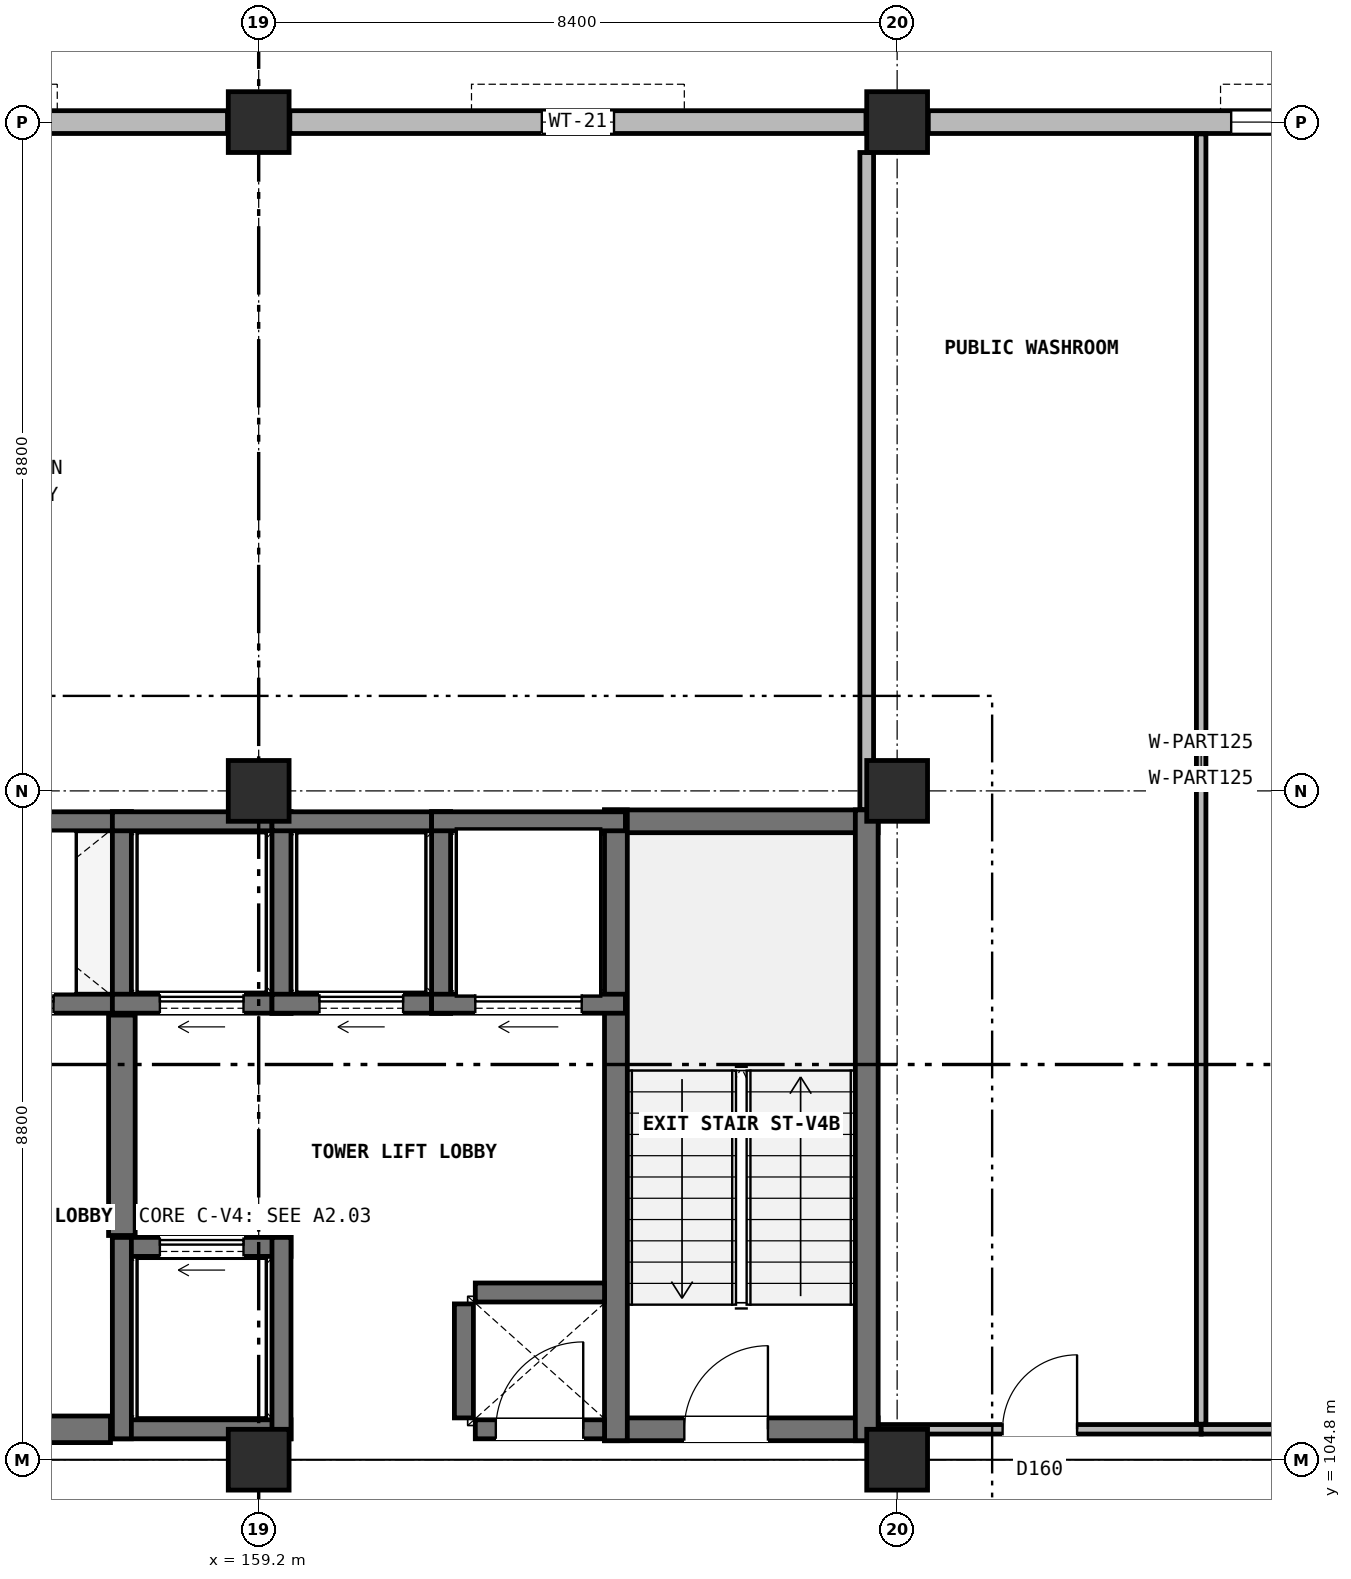
"""IFC4 building model, lengths in metres.
Left out: names, types, materials, properties, quantities, classifications, styles, units other than length and angle.
Written with IfcOpenShell. Run it as: python <this file> out.ifc"""

import sys

from ifc_helpers import new_model, si_unit, direction, frame, frame_2d, origin, origin_2d, place, context, subcontext, project, spatial, rectangle, extrude, element, fill, save


model = new_model("IFC4")
c1 = context("Model", 3, precision=1e-05, world=origin(), true_north=direction((0.0, 1.0)))
c2 = subcontext(c1, "Body", "Model", "MODEL_VIEW")
j1 = project(units=[si_unit("LENGTHUNIT", "METRE"), si_unit("PLANEANGLEUNIT", "RADIAN")], contexts=[c1])
p1 = place(None, origin())
s1 = spatial("IfcSite", under=j1, at=p1, CompositionType="ELEMENT")
p2 = place(p1, origin())
s2 = spatial("IfcBuilding", under=s1, at=p2, CompositionType="ELEMENT")
p3 = place(p2, frame((0.0, 0.0, 4.8)))
s3 = spatial("IfcBuildingStorey", under=s2, at=p3, CompositionType="ELEMENT", Elevation=4.8)
for number, where, z_axis, x_axis in (
    (1, (159.2, 104.8, 0.0), (0.0, 0.0, 1.0), (1.0, 0.0, 0.0)),
    (2, (159.2, 113.6, 0.0), (0.0, 0.0, 1.0), (1.0, 0.0, 0.0)),
    (3, (159.2, 122.4, 0.0), (0.0, 0.0, 1.0), (1.0, 0.0, 0.0)),
    (4, (167.6, 104.8, 0.0), (0.0, 0.0, 1.0), (1.0, 0.0, 0.0)),
    (5, (167.6, 113.6, 0.0), (0.0, 0.0, 1.0), (1.0, 0.0, 0.0)),
    (6, (167.6, 122.4, 0.0), (0.0, 0.0, 1.0), (1.0, 0.0, 0.0)),
):
    element("IfcColumn", number, at=place(p3, frame(where, z_axis=z_axis, x_axis=x_axis)), inside=s3, PredefinedType="COLUMN", context=c2, shape_type="SweptSolid", body=[
        extrude(rectangle(XDim=0.8, YDim=0.8, at=origin_2d()), origin(), (0.0, 0.0, 1.0), 4.2),
    ])
p4 = place(p3, frame((175.59, 122.4, 0.0), z_axis=(0.0, 0.0, 1.0), x_axis=(-1.0, 0.0, 0.0)))
e7 = element("IfcWall", 7, at=p4, inside=s3, PredefinedType="SOLIDWALL", context=c2, shape_type="SweptSolid", body=[
    extrude(rectangle(XDim=7.58, YDim=0.3, at=frame_2d((3.79, 0.0))), origin(), (0.0, 0.0, 1.0), 3.45),
])
p5 = place(p4, frame((0.395, 0.0, 0.9)))
e8 = element("IfcOpeningElement", 8, at=p5, cuts=e7, PredefinedType="OPENING", context=c2, shape_type="SweptSolid", body=[
    extrude(rectangle(XDim=3.2, YDim=2.1, at=frame_2d((1.6, 1.05))), frame((0.0, 0.16, 0.0), z_axis=(0.0, -1.0, 0.0), x_axis=(1.0, 0.0, 0.0)), (0.0, 0.0, 1.0), 0.32),
])
p6 = place(p3, frame((167.19, 122.4, 0.0), z_axis=(0.0, 0.0, 1.0), x_axis=(-1.0, 0.0, 0.0)))
e9 = element("IfcWall", 9, at=p6, inside=s3, PredefinedType="SOLIDWALL", context=c2, shape_type="SweptSolid", body=[
    extrude(rectangle(XDim=7.58, YDim=0.3, at=frame_2d((3.79, 0.0))), origin(), (0.0, 0.0, 1.0), 3.45),
])
p7 = place(p6, frame((3.315, 0.0, 0.9)))
e10 = element("IfcOpeningElement", 10, at=p7, cuts=e9, PredefinedType="OPENING", context=c2, shape_type="SweptSolid", body=[
    extrude(rectangle(XDim=0.95, YDim=1.6, at=frame_2d((0.475, 0.8))), frame((0.0, 0.16, 0.0), z_axis=(0.0, -1.0, 0.0), x_axis=(1.0, 0.0, 0.0)), (0.0, 0.0, 1.0), 0.32),
])
p8 = place(p3, frame((158.79, 122.4, 0.0), z_axis=(0.0, 0.0, 1.0), x_axis=(-1.0, 0.0, 0.0)))
e11 = element("IfcWall", 11, at=p8, inside=s3, PredefinedType="SOLIDWALL", context=c2, shape_type="SweptSolid", body=[
    extrude(rectangle(XDim=7.58, YDim=0.3, at=frame_2d((3.79, 0.0))), origin(), (0.0, 0.0, 1.0), 3.45),
])
p9 = place(p8, frame((3.24, 0.0, 0.9)))
e12 = element("IfcOpeningElement", 12, at=p9, cuts=e11, PredefinedType="OPENING", context=c2, shape_type="SweptSolid", body=[
    extrude(rectangle(XDim=1.1, YDim=1.65, at=frame_2d((0.55, 0.825))), frame((0.0, 0.16, 0.0), z_axis=(0.0, -1.0, 0.0), x_axis=(1.0, 0.0, 0.0)), (0.0, 0.0, 1.0), 0.32),
])
p10 = place(p3, frame((163.75, 105.2, 0.0), z_axis=(0.0, 0.0, 1.0), x_axis=(1.0, 0.0, 0.0)))
e13 = element("IfcWall", 13, at=p10, inside=s3, PredefinedType="SHEAR", context=c2, shape_type="SweptSolid", body=[
    extrude(rectangle(XDim=3.6, YDim=0.3, at=frame_2d((1.8, 0.0))), origin(), (0.0, 0.0, 1.0), 4.2),
])
p11 = place(p10, frame((1.05, 0.0, 0.0)))
e14 = element("IfcOpeningElement", 14, at=p11, cuts=e13, PredefinedType="OPENING", context=c2, shape_type="SweptSolid", body=[
    extrude(rectangle(XDim=1.1, YDim=2.2, at=frame_2d((0.55, 1.1))), frame((0.0, 0.16, 0.0), z_axis=(0.0, -1.0, 0.0), x_axis=(1.0, 0.0, 0.0)), (0.0, 0.0, 1.0), 0.32),
])
p12 = place(p3, frame((163.75, 113.2, 0.0), z_axis=(0.0, 0.0, 1.0), x_axis=(1.0, 0.0, 0.0)))
e15 = element("IfcWall", 15, at=p12, inside=s3, PredefinedType="SHEAR", context=c2, shape_type="SweptSolid", body=[
    extrude(rectangle(XDim=3.6, YDim=0.3, at=frame_2d((1.8, 0.0))), origin(), (0.0, 0.0, 1.0), 4.2),
])
for number, where, z_axis, x_axis in (
    (16, (163.9, 105.05, 0.0), (0.0, 0.0, 1.0), (0.0, 1.0, 0.0)),
    (17, (167.2, 105.05, 0.0), (0.0, 0.0, 1.0), (0.0, 1.0, 0.0)),
):
    element("IfcWall", number, at=place(p3, frame(where, z_axis=z_axis, x_axis=x_axis)), inside=s3, PredefinedType="SHEAR", context=c2, shape_type="SweptSolid", body=[
        extrude(rectangle(XDim=8.3, YDim=0.3, at=frame_2d((4.15, 0.0))), origin(), (0.0, 0.0, 1.0), 4.2),
    ])
p13 = place(p3, frame((154.275, 110.8, 0.0), z_axis=(0.0, 0.0, 1.0), x_axis=(1.0, 0.0, 0.0)))
e18 = element("IfcWall", 18, at=p13, inside=s3, PredefinedType="SOLIDWALL", context=c2, shape_type="SweptSolid", body=[
    extrude(rectangle(XDim=3.25, YDim=0.25, at=frame_2d((1.625, 0.0))), origin(), (0.0, 0.0, 1.0), 3.88),
])
p14 = place(p13, frame((1.025, 0.0, 0.0)))
e19 = element("IfcOpeningElement", 19, at=p14, cuts=e18, PredefinedType="OPENING", context=c2, shape_type="SweptSolid", body=[
    extrude(rectangle(XDim=1.2, YDim=2.2, at=frame_2d((0.6, 1.1))), frame((0.0, 0.135, 0.0), z_axis=(0.0, -1.0, 0.0), x_axis=(1.0, 0.0, 0.0)), (0.0, 0.0, 1.0), 0.27),
])
p15 = place(p3, frame((154.275, 113.2, 0.0), z_axis=(0.0, 0.0, 1.0), x_axis=(1.0, 0.0, 0.0)))
e20 = element("IfcWall", 20, at=p15, inside=s3, PredefinedType="SOLIDWALL", context=c2, shape_type="SweptSolid", body=[
    extrude(rectangle(XDim=3.25, YDim=0.25, at=frame_2d((1.625, 0.0))), origin(), (0.0, 0.0, 1.0), 3.88),
])
p16 = place(p3, frame((157.4, 110.675, 0.0), z_axis=(0.0, 0.0, 1.0), x_axis=(0.0, 1.0, 0.0)))
e21 = element("IfcWall", 21, at=p16, inside=s3, PredefinedType="SOLIDWALL", context=c2, shape_type="SweptSolid", body=[
    extrude(rectangle(XDim=2.65, YDim=0.25, at=frame_2d((1.325, 0.0))), origin(), (0.0, 0.0, 1.0), 3.88),
])
p17 = place(p3, frame((157.275, 110.8, 0.0), z_axis=(0.0, 0.0, 1.0), x_axis=(1.0, 0.0, 0.0)))
e22 = element("IfcWall", 22, at=p17, inside=s3, PredefinedType="SOLIDWALL", context=c2, shape_type="SweptSolid", body=[
    extrude(rectangle(XDim=2.35, YDim=0.25, at=frame_2d((1.175, 0.0))), origin(), (0.0, 0.0, 1.0), 3.88),
])
p18 = place(p17, frame((0.625, 0.0, 0.0)))
e23 = element("IfcOpeningElement", 23, at=p18, cuts=e22, PredefinedType="OPENING", context=c2, shape_type="SweptSolid", body=[
    extrude(rectangle(XDim=1.1, YDim=2.2, at=frame_2d((0.55, 1.1))), frame((0.0, 0.135, 0.0), z_axis=(0.0, -1.0, 0.0), x_axis=(1.0, 0.0, 0.0)), (0.0, 0.0, 1.0), 0.27),
])
p19 = place(p3, frame((157.275, 113.2, 0.0), z_axis=(0.0, 0.0, 1.0), x_axis=(1.0, 0.0, 0.0)))
e24 = element("IfcWall", 24, at=p19, inside=s3, PredefinedType="SOLIDWALL", context=c2, shape_type="SweptSolid", body=[
    extrude(rectangle(XDim=2.35, YDim=0.25, at=frame_2d((1.175, 0.0))), origin(), (0.0, 0.0, 1.0), 3.88),
])
p20 = place(p3, frame((159.5, 110.675, 0.0), z_axis=(0.0, 0.0, 1.0), x_axis=(0.0, 1.0, 0.0)))
e25 = element("IfcWall", 25, at=p20, inside=s3, PredefinedType="SOLIDWALL", context=c2, shape_type="SweptSolid", body=[
    extrude(rectangle(XDim=2.65, YDim=0.25, at=frame_2d((1.325, 0.0))), origin(), (0.0, 0.0, 1.0), 3.88),
])
p21 = place(p3, frame((159.375, 110.8, 0.0), z_axis=(0.0, 0.0, 1.0), x_axis=(1.0, 0.0, 0.0)))
e26 = element("IfcWall", 26, at=p21, inside=s3, PredefinedType="SOLIDWALL", context=c2, shape_type="SweptSolid", body=[
    extrude(rectangle(XDim=2.35, YDim=0.25, at=frame_2d((1.175, 0.0))), origin(), (0.0, 0.0, 1.0), 3.88),
])
p22 = place(p21, frame((0.625, 0.0, 0.0)))
e27 = element("IfcOpeningElement", 27, at=p22, cuts=e26, PredefinedType="OPENING", context=c2, shape_type="SweptSolid", body=[
    extrude(rectangle(XDim=1.1, YDim=2.2, at=frame_2d((0.55, 1.1))), frame((0.0, 0.135, 0.0), z_axis=(0.0, -1.0, 0.0), x_axis=(1.0, 0.0, 0.0)), (0.0, 0.0, 1.0), 0.27),
])
p23 = place(p3, frame((159.375, 113.2, 0.0), z_axis=(0.0, 0.0, 1.0), x_axis=(1.0, 0.0, 0.0)))
e28 = element("IfcWall", 28, at=p23, inside=s3, PredefinedType="SOLIDWALL", context=c2, shape_type="SweptSolid", body=[
    extrude(rectangle(XDim=2.35, YDim=0.25, at=frame_2d((1.175, 0.0))), origin(), (0.0, 0.0, 1.0), 3.88),
])
p24 = place(p3, frame((161.6, 110.675, 0.0), z_axis=(0.0, 0.0, 1.0), x_axis=(0.0, 1.0, 0.0)))
e29 = element("IfcWall", 29, at=p24, inside=s3, PredefinedType="SOLIDWALL", context=c2, shape_type="SweptSolid", body=[
    extrude(rectangle(XDim=2.65, YDim=0.25, at=frame_2d((1.325, 0.0))), origin(), (0.0, 0.0, 1.0), 3.88),
])
p25 = place(p3, frame((157.275, 105.2, 0.0), z_axis=(0.0, 0.0, 1.0), x_axis=(1.0, 0.0, 0.0)))
e30 = element("IfcWall", 30, at=p25, inside=s3, PredefinedType="SOLIDWALL", context=c2, shape_type="SweptSolid", body=[
    extrude(rectangle(XDim=2.35, YDim=0.25, at=frame_2d((1.175, 0.0))), origin(), (0.0, 0.0, 1.0), 3.88),
])
p26 = place(p3, frame((157.275, 107.6, 0.0), z_axis=(0.0, 0.0, 1.0), x_axis=(1.0, 0.0, 0.0)))
e31 = element("IfcWall", 31, at=p26, inside=s3, PredefinedType="SOLIDWALL", context=c2, shape_type="SweptSolid", body=[
    extrude(rectangle(XDim=2.35, YDim=0.25, at=frame_2d((1.175, 0.0))), origin(), (0.0, 0.0, 1.0), 3.88),
])
p27 = place(p26, frame((0.625, 0.0, 0.0)))
e32 = element("IfcOpeningElement", 32, at=p27, cuts=e31, PredefinedType="OPENING", context=c2, shape_type="SweptSolid", body=[
    extrude(rectangle(XDim=1.1, YDim=2.2, at=frame_2d((0.55, 1.1))), frame((0.0, 0.135, 0.0), z_axis=(0.0, -1.0, 0.0), x_axis=(1.0, 0.0, 0.0)), (0.0, 0.0, 1.0), 0.27),
])
for number, where, z_axis, x_axis in (
    (33, (157.4, 105.075, 0.0), (0.0, 0.0, 1.0), (0.0, 1.0, 0.0)),
    (34, (159.5, 105.075, 0.0), (0.0, 0.0, 1.0), (0.0, 1.0, 0.0)),
):
    element("IfcWall", number, at=place(p3, frame(where, z_axis=z_axis, x_axis=x_axis)), inside=s3, PredefinedType="SOLIDWALL", context=c2, shape_type="SweptSolid", body=[
        extrude(rectangle(XDim=2.65, YDim=0.25, at=frame_2d((1.325, 0.0))), origin(), (0.0, 0.0, 1.0), 3.88),
    ])
p28 = place(p3, frame((161.475, 110.8, 0.0), z_axis=(0.0, 0.0, 1.0), x_axis=(1.0, 0.0, 0.0)))
e35 = element("IfcWall", 35, at=p28, inside=s3, PredefinedType="SOLIDWALL", context=c2, shape_type="SweptSolid", body=[
    extrude(rectangle(XDim=2.55, YDim=0.25, at=frame_2d((1.275, 0.0))), origin(), (0.0, 0.0, 1.0), 3.88),
])
p29 = place(p28, frame((0.575, 0.0, 0.0)))
e36 = element("IfcOpeningElement", 36, at=p29, cuts=e35, PredefinedType="OPENING", context=c2, shape_type="SweptSolid", body=[
    extrude(rectangle(XDim=1.4, YDim=2.3, at=frame_2d((0.7, 1.15))), frame((0.0, 0.135, 0.0), z_axis=(0.0, -1.0, 0.0), x_axis=(1.0, 0.0, 0.0)), (0.0, 0.0, 1.0), 0.27),
])
p30 = place(p3, frame((161.475, 113.2, 0.0), z_axis=(0.0, 0.0, 1.0), x_axis=(1.0, 0.0, 0.0)))
e37 = element("IfcWall", 37, at=p30, inside=s3, PredefinedType="SOLIDWALL", context=c2, shape_type="SweptSolid", body=[
    extrude(rectangle(XDim=2.55, YDim=0.25, at=frame_2d((1.275, 0.0))), origin(), (0.0, 0.0, 1.0), 3.88),
])
p31 = place(p3, frame((157.4, 107.75, 0.0), z_axis=(0.0, 0.0, 1.0), x_axis=(0.0, 1.0, 0.0)))
e38 = element("IfcWall", 38, at=p31, inside=s3, PredefinedType="SHEAR", context=c2, shape_type="SweptSolid", body=[
    extrude(rectangle(XDim=2.9, YDim=0.35, at=frame_2d((1.45, 0.0))), origin(), (0.0, 0.0, 1.0), 3.88),
])
p32 = place(p3, frame((154.55, 105.2, 0.0), z_axis=(0.0, 0.0, 1.0), x_axis=(1.0, 0.0, 0.0)))
e39 = element("IfcWall", 39, at=p32, inside=s3, PredefinedType="SHEAR", context=c2, shape_type="SweptSolid", body=[
    extrude(rectangle(XDim=2.7, YDim=0.35, at=frame_2d((1.35, 0.0))), origin(), (0.0, 0.0, 1.0), 3.88),
])
p33 = place(p32, frame((0.8, 0.0, 0.0)))
e40 = element("IfcOpeningElement", 40, at=p33, cuts=e39, PredefinedType="OPENING", context=c2, shape_type="SweptSolid", body=[
    extrude(rectangle(XDim=1.1, YDim=2.2, at=frame_2d((0.55, 1.1))), frame((0.0, 0.185, 0.0), z_axis=(0.0, -1.0, 0.0), x_axis=(1.0, 0.0, 0.0)), (0.0, 0.0, 1.0), 0.37),
])
p34 = place(p3, frame((161.9, 105.35, 0.0), z_axis=(0.0, 0.0, 1.0), x_axis=(0.0, 1.0, 0.0)))
e41 = element("IfcWall", 41, at=p34, inside=s3, PredefinedType="SOLIDWALL", context=c2, shape_type="SweptSolid", body=[
    extrude(rectangle(XDim=1.5, YDim=0.25, at=frame_2d((0.75, 0.0))), origin(), (0.0, 0.0, 1.0), 3.88),
])
p35 = place(p3, frame((162.05, 107.0, 0.0), z_axis=(0.0, 0.0, 1.0), x_axis=(1.0, 0.0, 0.0)))
e42 = element("IfcWall", 42, at=p35, inside=s3, PredefinedType="SOLIDWALL", context=c2, shape_type="SweptSolid", body=[
    extrude(rectangle(XDim=1.7, YDim=0.25, at=frame_2d((0.85, 0.0))), origin(), (0.0, 0.0, 1.0), 3.88),
])
p36 = place(p3, frame((162.05, 105.2, 0.0), z_axis=(0.0, 0.0, 1.0), x_axis=(1.0, 0.0, 0.0)))
e43 = element("IfcWall", 43, at=p36, inside=s3, PredefinedType="SOLIDWALL", context=c2, shape_type="SweptSolid", body=[
    extrude(rectangle(XDim=1.7, YDim=0.25, at=frame_2d((0.85, 0.0))), origin(), (0.0, 0.0, 1.0), 3.88),
])
p37 = place(p36, frame((0.27, 0.0, 0.0)))
e44 = element("IfcOpeningElement", 44, at=p37, cuts=e43, PredefinedType="OPENING", context=c2, shape_type="SweptSolid", body=[
    extrude(rectangle(XDim=1.15, YDim=2.2, at=frame_2d((0.575, 1.1))), frame((0.0, 0.135, 0.0), z_axis=(0.0, -1.0, 0.0), x_axis=(1.0, 0.0, 0.0)), (0.0, 0.0, 1.0), 0.27),
])
p38 = place(p3, frame((167.355, 105.2, 0.0), z_axis=(0.0, 0.0, 1.0), x_axis=(1.0, 0.0, 0.0)))
e45 = element("IfcWall", 45, at=p38, inside=s3, PredefinedType="PARTITIONING", context=c2, shape_type="SweptSolid", body=[
    extrude(rectangle(XDim=4.245, YDim=0.125, at=frame_2d((2.123, 0.0))), origin(), (0.0, 0.0, 1.0), 3.445),
])
p39 = place(p38, frame((1.633, 0.0, 0.0)))
e46 = element("IfcOpeningElement", 46, at=p39, cuts=e45, PredefinedType="OPENING", context=c2, shape_type="SweptSolid", body=[
    extrude(rectangle(XDim=0.98, YDim=2.1, at=frame_2d((0.49, 1.05))), frame((0.0, 0.073, 0.0), z_axis=(0.0, -1.0, 0.0), x_axis=(1.0, 0.0, 0.0)), (0.0, 0.0, 1.0), 0.145),
])
p40 = place(p3, frame((171.6, 105.2, 0.0), z_axis=(0.0, 0.0, 1.0), x_axis=(1.0, 0.0, 0.0)))
e47 = element("IfcWall", 47, at=p40, inside=s3, PredefinedType="PARTITIONING", context=c2, shape_type="SweptSolid", body=[
    extrude(rectangle(XDim=4.0, YDim=0.125, at=frame_2d((2.0, 0.0))), origin(), (0.0, 0.0, 1.0), 3.445),
])
p41 = place(p40, frame((1.51, 0.0, 0.0)))
e48 = element("IfcOpeningElement", 48, at=p41, cuts=e47, PredefinedType="OPENING", context=c2, shape_type="SweptSolid", body=[
    extrude(rectangle(XDim=0.98, YDim=2.1, at=frame_2d((0.49, 1.05))), frame((0.0, 0.073, 0.0), z_axis=(0.0, -1.0, 0.0), x_axis=(1.0, 0.0, 0.0)), (0.0, 0.0, 1.0), 0.145),
])
p42 = place(p3, frame((167.2, 113.355, 0.0), z_axis=(0.0, 0.0, 1.0), x_axis=(0.0, 1.0, 0.0)))
e49 = element("IfcWall", 49, at=p42, inside=s3, PredefinedType="PARTITIONING", context=c2, shape_type="SweptSolid", body=[
    extrude(rectangle(XDim=8.645, YDim=0.18, at=frame_2d((4.323, 0.0))), origin(), (0.0, 0.0, 1.0), 3.445),
])
p43 = place(p3, frame((171.6, 105.268, 0.0), z_axis=(0.0, 0.0, 1.0), x_axis=(0.0, 1.0, 0.0)))
e50 = element("IfcWall", 50, at=p43, inside=s3, PredefinedType="PARTITIONING", context=c2, shape_type="SweptSolid", body=[
    extrude(rectangle(XDim=16.978, YDim=0.125, at=frame_2d((8.489, 0.0))), origin(), (0.0, 0.0, 1.0), 3.865),
])
p44 = place(p5, origin())
e51 = element("IfcWindow", 51, at=p44, inside=s3, PartitioningType="SINGLE_PANEL", PredefinedType="WINDOW", context=c2, shape_type="SweptSolid", body=[
    extrude(rectangle(XDim=3.2, YDim=2.1, at=frame_2d((1.6, 1.05))), frame((0.0, 0.03, 0.0), z_axis=(0.0, -1.0, 0.0), x_axis=(1.0, 0.0, 0.0)), (0.0, 0.0, 1.0), 0.06),
])
fill(e8, e51)
p45 = place(p7, origin())
e52 = element("IfcWindow", 52, at=p45, inside=s3, PartitioningType="SINGLE_PANEL", PredefinedType="WINDOW", context=c2, shape_type="SweptSolid", body=[
    extrude(rectangle(XDim=0.95, YDim=1.6, at=frame_2d((0.475, 0.8))), frame((0.0, 0.03, 0.0), z_axis=(0.0, -1.0, 0.0), x_axis=(1.0, 0.0, 0.0)), (0.0, 0.0, 1.0), 0.06),
])
fill(e10, e52)
p46 = place(p11, origin())
e53 = element("IfcDoor", 53, at=p46, inside=s3, OperationType="SINGLE_SWING_RIGHT", PredefinedType="DOOR", context=c2, shape_type="SweptSolid", body=[
    extrude(rectangle(XDim=1.1, YDim=2.2, at=frame_2d((0.55, 1.1))), frame((0.0, 0.025, 0.0), z_axis=(0.0, -1.0, 0.0), x_axis=(1.0, 0.0, 0.0)), (0.0, 0.0, 1.0), 0.05),
])
fill(e14, e53)
p47 = place(p14, origin())
e54 = element("IfcDoor", 54, at=p47, inside=s3, OperationType="SLIDING_TO_LEFT", PredefinedType="DOOR", context=c2, shape_type="SweptSolid", body=[
    extrude(rectangle(XDim=1.2, YDim=2.2, at=frame_2d((0.6, 1.1))), frame((0.0, 0.025, 0.0), z_axis=(0.0, -1.0, 0.0), x_axis=(1.0, 0.0, 0.0)), (0.0, 0.0, 1.0), 0.05),
])
fill(e19, e54)
p48 = place(p18, origin())
e55 = element("IfcDoor", 55, at=p48, inside=s3, OperationType="SLIDING_TO_LEFT", PredefinedType="DOOR", context=c2, shape_type="SweptSolid", body=[
    extrude(rectangle(XDim=1.1, YDim=2.2, at=frame_2d((0.55, 1.1))), frame((0.0, 0.025, 0.0), z_axis=(0.0, -1.0, 0.0), x_axis=(1.0, 0.0, 0.0)), (0.0, 0.0, 1.0), 0.05),
])
fill(e23, e55)
p49 = place(p22, origin())
e56 = element("IfcDoor", 56, at=p49, inside=s3, OperationType="SLIDING_TO_LEFT", PredefinedType="DOOR", context=c2, shape_type="SweptSolid", body=[
    extrude(rectangle(XDim=1.1, YDim=2.2, at=frame_2d((0.55, 1.1))), frame((0.0, 0.025, 0.0), z_axis=(0.0, -1.0, 0.0), x_axis=(1.0, 0.0, 0.0)), (0.0, 0.0, 1.0), 0.05),
])
fill(e27, e56)
p50 = place(p27, origin())
e57 = element("IfcDoor", 57, at=p50, inside=s3, OperationType="SLIDING_TO_LEFT", PredefinedType="DOOR", context=c2, shape_type="SweptSolid", body=[
    extrude(rectangle(XDim=1.1, YDim=2.2, at=frame_2d((0.55, 1.1))), frame((0.0, 0.025, 0.0), z_axis=(0.0, -1.0, 0.0), x_axis=(1.0, 0.0, 0.0)), (0.0, 0.0, 1.0), 0.05),
])
fill(e32, e57)
p51 = place(p29, origin())
e58 = element("IfcDoor", 58, at=p51, inside=s3, OperationType="SLIDING_TO_LEFT", PredefinedType="DOOR", context=c2, shape_type="SweptSolid", body=[
    extrude(rectangle(XDim=1.4, YDim=2.3, at=frame_2d((0.7, 1.15))), frame((0.0, 0.025, 0.0), z_axis=(0.0, -1.0, 0.0), x_axis=(1.0, 0.0, 0.0)), (0.0, 0.0, 1.0), 0.05),
])
fill(e36, e58)
p52 = place(p37, origin())
e59 = element("IfcDoor", 59, at=p52, inside=s3, OperationType="SINGLE_SWING_RIGHT", PredefinedType="DOOR", context=c2, shape_type="SweptSolid", body=[
    extrude(rectangle(XDim=1.15, YDim=2.2, at=frame_2d((0.575, 1.1))), frame((0.0, 0.025, 0.0), z_axis=(0.0, -1.0, 0.0), x_axis=(1.0, 0.0, 0.0)), (0.0, 0.0, 1.0), 0.05),
])
fill(e44, e59)
p53 = place(p39, origin())
e60 = element("IfcDoor", 60, at=p53, inside=s3, OperationType="SINGLE_SWING_RIGHT", PredefinedType="DOOR", context=c2, shape_type="SweptSolid", body=[
    extrude(rectangle(XDim=0.98, YDim=2.1, at=frame_2d((0.49, 1.05))), frame((0.0, 0.025, 0.0), z_axis=(0.0, -1.0, 0.0), x_axis=(1.0, 0.0, 0.0)), (0.0, 0.0, 1.0), 0.05),
])
fill(e46, e60)
save(model, sys.argv[1])
